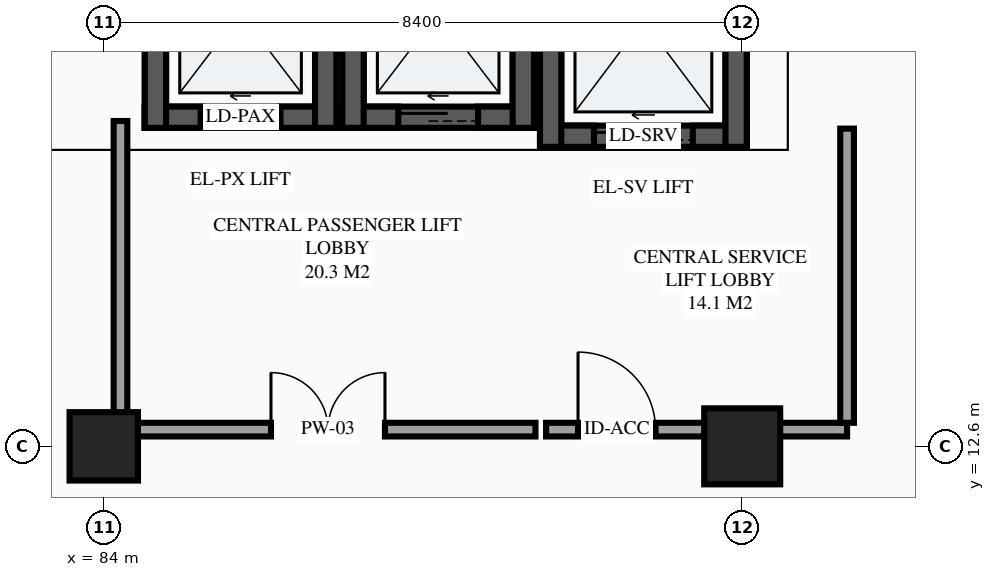
"""IFC4 building model, lengths in metres.
Left out: names, types, materials, properties, quantities, classifications, styles, units other than length and angle.
Written with IfcOpenShell. Run it as: python <this file> out.ifc"""

import sys

from ifc_helpers import new_model, si_unit, direction, frame, frame_2d, origin, origin_2d, place, context, subcontext, project, spatial, rectangle, extrude, element, fill, save


model = new_model("IFC4")
c1 = context("Model", 3, precision=1e-05, world=origin(), true_north=direction((0.0, 1.0)))
c2 = subcontext(c1, "Body", "Model", "MODEL_VIEW")
j1 = project(units=[si_unit("LENGTHUNIT", "METRE"), si_unit("PLANEANGLEUNIT", "RADIAN")], contexts=[c1])
p1 = place(None, origin())
s1 = spatial("IfcSite", under=j1, at=p1, CompositionType="ELEMENT")
p2 = place(p1, origin())
s2 = spatial("IfcBuilding", under=s1, at=p2, CompositionType="ELEMENT")
p3 = place(p2, frame((0.0, 0.0, -4.5)))
s3 = spatial("IfcBuildingStorey", under=s2, at=p3, CompositionType="ELEMENT", Elevation=-4.5)
p4 = place(p3, frame((84.0, 12.6, -0.36), z_axis=(0.0, 0.0, 1.0), x_axis=(1.0, 0.0, 0.0)))
e1 = element("IfcColumn", 1, at=p4, inside=s3, PredefinedType="COLUMN", context=c2, shape_type="SweptSolid", body=[
    extrude(rectangle(XDim=0.9, YDim=0.9, at=origin_2d()), origin(), (0.0, 0.0, 1.0), 4.86),
])
p5 = place(p3, frame((92.4, 12.6, -0.36), z_axis=(0.0, 0.0, 1.0), x_axis=(1.0, 0.0, 0.0)))
e2 = element("IfcColumn", 2, at=p5, inside=s3, PredefinedType="COLUMN", context=c2, shape_type="SweptSolid", body=[
    extrude(rectangle(XDim=1.0, YDim=1.0, at=origin_2d()), origin(), (0.0, 0.0, 1.0), 4.86),
])
p6 = place(p3, frame((84.54, 16.93, -1.5), z_axis=(0.0, 0.0, 1.0), x_axis=(1.0, 0.0, 0.0)))
e3 = element("IfcWall", 3, at=p6, inside=s3, PredefinedType="SHEAR", context=c2, shape_type="SweptSolid", body=[
    extrude(rectangle(XDim=2.52, YDim=0.28, at=frame_2d((1.26, 0.0))), origin(), (0.0, 0.0, 1.0), 1.5),
])
for number, where, z_axis, x_axis in (
    (4, (86.92, 16.79, -1.5), (0.0, 0.0, 1.0), (0.0, 1.0, 0.0)),
    (5, (84.68, 19.81, -1.5), (0.0, 0.0, 1.0), (0.0, -1.0, 0.0)),
):
    element("IfcWall", number, at=place(p3, frame(where, z_axis=z_axis, x_axis=x_axis)), inside=s3, PredefinedType="SHEAR", context=c2, shape_type="SweptSolid", body=[
        extrude(rectangle(XDim=3.02, YDim=0.28, at=frame_2d((1.51, 0.0))), origin(), (0.0, 0.0, 1.0), 1.5),
    ])
p7 = place(p3, frame((84.54, 16.93, 0.0), z_axis=(0.0, 0.0, 1.0), x_axis=(1.0, 0.0, 0.0)))
e6 = element("IfcWall", 6, at=p7, inside=s3, PredefinedType="SHEAR", context=c2, shape_type="SweptSolid", body=[
    extrude(rectangle(XDim=2.52, YDim=0.28, at=frame_2d((1.26, 0.0))), origin(), (0.0, 0.0, 1.0), 4.5),
])
p8 = place(p7, frame((0.735, 0.0, 0.0)))
e7 = element("IfcOpeningElement", 7, at=p8, cuts=e6, PredefinedType="OPENING", context=c2, shape_type="SweptSolid", body=[
    extrude(rectangle(XDim=1.05, YDim=2.2, at=frame_2d((0.525, 1.1))), frame((0.0, 0.15, 0.0), z_axis=(0.0, -1.0, 0.0), x_axis=(1.0, 0.0, 0.0)), (0.0, 0.0, 1.0), 0.3),
])
for number, where, z_axis, x_axis in (
    (8, (86.92, 16.79, 0.0), (0.0, 0.0, 1.0), (0.0, 1.0, 0.0)),
    (9, (84.68, 19.81, 0.0), (0.0, 0.0, 1.0), (0.0, -1.0, 0.0)),
):
    element("IfcWall", number, at=place(p3, frame(where, z_axis=z_axis, x_axis=x_axis)), inside=s3, PredefinedType="SHEAR", context=c2, shape_type="SweptSolid", body=[
        extrude(rectangle(XDim=3.02, YDim=0.28, at=frame_2d((1.51, 0.0))), origin(), (0.0, 0.0, 1.0), 4.5),
    ])
p9 = place(p3, frame((87.14, 16.93, -1.5), z_axis=(0.0, 0.0, 1.0), x_axis=(1.0, 0.0, 0.0)))
e10 = element("IfcWall", 10, at=p9, inside=s3, PredefinedType="SHEAR", context=c2, shape_type="SweptSolid", body=[
    extrude(rectangle(XDim=2.52, YDim=0.28, at=frame_2d((1.26, 0.0))), origin(), (0.0, 0.0, 1.0), 1.5),
])
for number, where, z_axis, x_axis in (
    (11, (89.52, 16.79, -1.5), (0.0, 0.0, 1.0), (0.0, 1.0, 0.0)),
    (12, (87.28, 19.81, -1.5), (0.0, 0.0, 1.0), (0.0, -1.0, 0.0)),
):
    element("IfcWall", number, at=place(p3, frame(where, z_axis=z_axis, x_axis=x_axis)), inside=s3, PredefinedType="SHEAR", context=c2, shape_type="SweptSolid", body=[
        extrude(rectangle(XDim=3.02, YDim=0.28, at=frame_2d((1.51, 0.0))), origin(), (0.0, 0.0, 1.0), 1.5),
    ])
p10 = place(p3, frame((87.14, 16.93, 0.0), z_axis=(0.0, 0.0, 1.0), x_axis=(1.0, 0.0, 0.0)))
e13 = element("IfcWall", 13, at=p10, inside=s3, PredefinedType="SHEAR", context=c2, shape_type="SweptSolid", body=[
    extrude(rectangle(XDim=2.52, YDim=0.28, at=frame_2d((1.26, 0.0))), origin(), (0.0, 0.0, 1.0), 4.5),
])
p11 = place(p10, frame((0.735, 0.0, 0.0)))
e14 = element("IfcOpeningElement", 14, at=p11, cuts=e13, PredefinedType="OPENING", context=c2, shape_type="SweptSolid", body=[
    extrude(rectangle(XDim=1.05, YDim=2.2, at=frame_2d((0.525, 1.1))), frame((0.0, 0.15, 0.0), z_axis=(0.0, -1.0, 0.0), x_axis=(1.0, 0.0, 0.0)), (0.0, 0.0, 1.0), 0.3),
])
for number, where, z_axis, x_axis in (
    (15, (89.52, 16.79, 0.0), (0.0, 0.0, 1.0), (0.0, 1.0, 0.0)),
    (16, (87.28, 19.81, 0.0), (0.0, 0.0, 1.0), (0.0, -1.0, 0.0)),
):
    element("IfcWall", number, at=place(p3, frame(where, z_axis=z_axis, x_axis=x_axis)), inside=s3, PredefinedType="SHEAR", context=c2, shape_type="SweptSolid", body=[
        extrude(rectangle(XDim=3.02, YDim=0.28, at=frame_2d((1.51, 0.0))), origin(), (0.0, 0.0, 1.0), 4.5),
    ])
p12 = place(p3, frame((89.74, 16.68, -1.5), z_axis=(0.0, 0.0, 1.0), x_axis=(1.0, 0.0, 0.0)))
e17 = element("IfcWall", 17, at=p12, inside=s3, PredefinedType="SHEAR", context=c2, shape_type="SweptSolid", body=[
    extrude(rectangle(XDim=2.72, YDim=0.28, at=frame_2d((1.36, 0.0))), origin(), (0.0, 0.0, 1.0), 1.5),
])
for number, where, z_axis, x_axis in (
    (18, (92.32, 16.54, -1.5), (0.0, 0.0, 1.0), (0.0, 1.0, 0.0)),
    (19, (89.88, 19.86, -1.5), (0.0, 0.0, 1.0), (0.0, -1.0, 0.0)),
):
    element("IfcWall", number, at=place(p3, frame(where, z_axis=z_axis, x_axis=x_axis)), inside=s3, PredefinedType="SHEAR", context=c2, shape_type="SweptSolid", body=[
        extrude(rectangle(XDim=3.32, YDim=0.28, at=frame_2d((1.66, 0.0))), origin(), (0.0, 0.0, 1.0), 1.5),
    ])
p13 = place(p3, frame((89.74, 16.68, 0.0), z_axis=(0.0, 0.0, 1.0), x_axis=(1.0, 0.0, 0.0)))
e20 = element("IfcWall", 20, at=p13, inside=s3, PredefinedType="SHEAR", context=c2, shape_type="SweptSolid", body=[
    extrude(rectangle(XDim=2.72, YDim=0.28, at=frame_2d((1.36, 0.0))), origin(), (0.0, 0.0, 1.0), 4.5),
])
p14 = place(p13, frame((0.71, 0.0, 0.0)))
e21 = element("IfcOpeningElement", 21, at=p14, cuts=e20, PredefinedType="OPENING", context=c2, shape_type="SweptSolid", body=[
    extrude(rectangle(XDim=1.3, YDim=2.25, at=frame_2d((0.65, 1.125))), frame((0.0, 0.15, 0.0), z_axis=(0.0, -1.0, 0.0), x_axis=(1.0, 0.0, 0.0)), (0.0, 0.0, 1.0), 0.3),
])
for number, where, z_axis, x_axis in (
    (22, (92.32, 16.54, 0.0), (0.0, 0.0, 1.0), (0.0, 1.0, 0.0)),
    (23, (89.88, 19.86, 0.0), (0.0, 0.0, 1.0), (0.0, -1.0, 0.0)),
):
    element("IfcWall", number, at=place(p3, frame(where, z_axis=z_axis, x_axis=x_axis)), inside=s3, PredefinedType="SHEAR", context=c2, shape_type="SweptSolid", body=[
        extrude(rectangle(XDim=3.32, YDim=0.28, at=frame_2d((1.66, 0.0))), origin(), (0.0, 0.0, 1.0), 4.5),
    ])
p15 = place(p3, frame((84.22, 12.82, 0.0), z_axis=(0.0, 0.0, 1.0), x_axis=(1.0, 0.0, 0.0)))
e24 = element("IfcWall", 24, at=p15, inside=s3, PredefinedType="PARTITIONING", context=c2, shape_type="SweptSolid", body=[
    extrude(rectangle(XDim=5.46, YDim=0.18, at=frame_2d((2.73, 0.0))), origin(), (0.0, 0.0, 1.0), 3.43),
])
p16 = place(p15, frame((1.98, 0.0, 0.0)))
e25 = element("IfcOpeningElement", 25, at=p16, cuts=e24, PredefinedType="OPENING", context=c2, shape_type="SweptSolid", body=[
    extrude(rectangle(XDim=1.5, YDim=2.15, at=frame_2d((0.75, 1.075))), frame((0.0, 0.1, 0.0), z_axis=(0.0, -1.0, 0.0), x_axis=(1.0, 0.0, 0.0)), (0.0, 0.0, 1.0), 0.2),
])
p17 = place(p3, frame((84.22, 12.91, 0.0), z_axis=(0.0, 0.0, 1.0), x_axis=(0.0, 1.0, 0.0)))
e26 = element("IfcWall", 26, at=p17, inside=s3, PredefinedType="PARTITIONING", context=c2, shape_type="SweptSolid", body=[
    extrude(rectangle(XDim=3.97, YDim=0.18, at=frame_2d((1.985, 0.0))), origin(), (0.0, 0.0, 1.0), 4.175),
])
p18 = place(p3, frame((89.82, 12.82, 0.0), z_axis=(0.0, 0.0, 1.0), x_axis=(1.0, 0.0, 0.0)))
e27 = element("IfcWall", 27, at=p18, inside=s3, PredefinedType="PARTITIONING", context=c2, shape_type="SweptSolid", body=[
    extrude(rectangle(XDim=3.96, YDim=0.18, at=frame_2d((1.98, 0.0))), origin(), (0.0, 0.0, 1.0), 3.43),
])
p19 = place(p18, frame((0.42, 0.0, 0.0)))
e28 = element("IfcOpeningElement", 28, at=p19, cuts=e27, PredefinedType="OPENING", context=c2, shape_type="SweptSolid", body=[
    extrude(rectangle(XDim=1.02, YDim=2.15, at=frame_2d((0.51, 1.075))), frame((0.0, 0.1, 0.0), z_axis=(0.0, -1.0, 0.0), x_axis=(1.0, 0.0, 0.0)), (0.0, 0.0, 1.0), 0.2),
])
p20 = place(p3, frame((93.78, 12.91, 0.0), z_axis=(0.0, 0.0, 1.0), x_axis=(0.0, 1.0, 0.0)))
e29 = element("IfcWall", 29, at=p20, inside=s3, PredefinedType="PARTITIONING", context=c2, shape_type="SweptSolid", body=[
    extrude(rectangle(XDim=3.87, YDim=0.18, at=frame_2d((1.935, 0.0))), origin(), (0.0, 0.0, 1.0), 4.175),
])
p21 = place(p8, origin())
e30 = element("IfcDoor", 30, at=p21, inside=s3, OperationType="SLIDING_TO_LEFT", PredefinedType="DOOR", context=c2, shape_type="SweptSolid", body=[
    extrude(rectangle(XDim=1.05, YDim=2.2, at=frame_2d((0.525, 1.1))), frame((0.0, 0.025, 0.0), z_axis=(0.0, -1.0, 0.0), x_axis=(1.0, 0.0, 0.0)), (0.0, 0.0, 1.0), 0.05),
])
fill(e7, e30)
p22 = place(p11, origin())
e31 = element("IfcDoor", 31, at=p22, inside=s3, OperationType="SLIDING_TO_LEFT", PredefinedType="DOOR", context=c2, shape_type="SweptSolid", body=[
    extrude(rectangle(XDim=1.05, YDim=2.2, at=frame_2d((0.525, 1.1))), frame((0.0, 0.025, 0.0), z_axis=(0.0, -1.0, 0.0), x_axis=(1.0, 0.0, 0.0)), (0.0, 0.0, 1.0), 0.05),
])
fill(e14, e31)
p23 = place(p14, origin())
e32 = element("IfcDoor", 32, at=p23, inside=s3, OperationType="SLIDING_TO_LEFT", PredefinedType="DOOR", context=c2, shape_type="SweptSolid", body=[
    extrude(rectangle(XDim=1.3, YDim=2.25, at=frame_2d((0.65, 1.125))), frame((0.0, 0.025, 0.0), z_axis=(0.0, -1.0, 0.0), x_axis=(1.0, 0.0, 0.0)), (0.0, 0.0, 1.0), 0.05),
])
fill(e21, e32)
p24 = place(p16, origin())
e33 = element("IfcDoor", 33, at=p24, inside=s3, OperationType="DOUBLE_DOOR_SINGLE_SWING", PredefinedType="DOOR", context=c2, shape_type="SweptSolid", body=[
    extrude(rectangle(XDim=1.5, YDim=2.15, at=frame_2d((0.75, 1.075))), frame((0.0, 0.025, 0.0), z_axis=(0.0, -1.0, 0.0), x_axis=(1.0, 0.0, 0.0)), (0.0, 0.0, 1.0), 0.05),
])
fill(e25, e33)
p25 = place(p19, origin())
e34 = element("IfcDoor", 34, at=p25, inside=s3, OperationType="SINGLE_SWING_LEFT", PredefinedType="DOOR", context=c2, shape_type="SweptSolid", body=[
    extrude(rectangle(XDim=1.02, YDim=2.15, at=frame_2d((0.51, 1.075))), frame((0.0, 0.025, 0.0), z_axis=(0.0, -1.0, 0.0), x_axis=(1.0, 0.0, 0.0)), (0.0, 0.0, 1.0), 0.05),
])
fill(e28, e34)
save(model, sys.argv[1])
